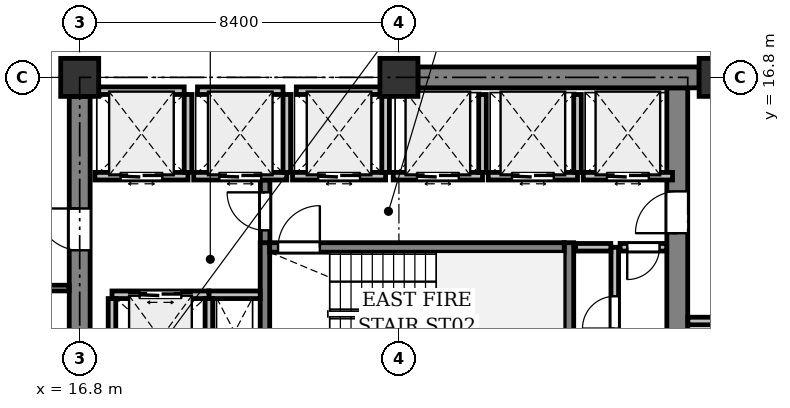
"""IFC4 building model, lengths in metres.
Left out: names, types, materials, properties, quantities, classifications, styles, units other than length and angle.
Written with IfcOpenShell. Run it as: python <this file> out.ifc"""

import sys

from ifc_helpers import new_model, si_unit, direction, frame, frame_2d, origin, origin_2d, place, context, subcontext, project, spatial, rectangle, extrude, element, fill, save


model = new_model("IFC4")
c1 = context("Model", 3, precision=1e-05, world=origin(), true_north=direction((0.0, 1.0)))
c2 = subcontext(c1, "Body", "Model", "MODEL_VIEW")
j1 = project(units=[si_unit("LENGTHUNIT", "METRE"), si_unit("PLANEANGLEUNIT", "RADIAN")], contexts=[c1])
p1 = place(None, origin())
s1 = spatial("IfcSite", under=j1, at=p1, CompositionType="ELEMENT")
p2 = place(p1, origin())
s2 = spatial("IfcBuilding", under=s1, at=p2, CompositionType="ELEMENT")
p3 = place(p2, frame((0.0, 0.0, 220.6)))
s3 = spatial("IfcBuildingStorey", under=s2, at=p3, CompositionType="ELEMENT", Elevation=220.6)
for number, where, z_axis, x_axis in (
    (1, (16.8, 16.8, 0.0), (0.0, 0.0, 1.0), (1.0, 0.0, 0.0)),
    (2, (25.2, 16.8, 0.0), (0.0, 0.0, 1.0), (1.0, 0.0, 0.0)),
    (3, (33.6, 16.8, 0.0), (0.0, 0.0, 1.0), (1.0, 0.0, 0.0)),
):
    element("IfcColumn", number, at=place(p3, frame(where, z_axis=z_axis, x_axis=x_axis)), inside=s3, PredefinedType="COLUMN", context=c2, shape_type="SweptSolid", body=[
        extrude(rectangle(XDim=1.0, YDim=1.0, at=origin_2d()), origin(), (0.0, 0.0, 1.0), 4.1),
    ])
p4 = place(p3, frame((32.525, 8.675, 0.0), z_axis=(0.0, 0.0, 1.0), x_axis=(0.0, 1.0, 0.0)))
e4 = element("IfcWall", 4, at=p4, inside=s3, PredefinedType="SHEAR", context=c2, shape_type="SweptSolid", body=[
    extrude(rectangle(XDim=7.85, YDim=0.55, at=frame_2d((3.925, 0.0))), origin(), (0.0, 0.0, 1.0), 3.825),
])
p5 = place(p4, frame((4.025, 0.0, 0.0)))
e5 = element("IfcOpeningElement", 5, at=p5, cuts=e4, PredefinedType="OPENING", context=c2, shape_type="SweptSolid", body=[
    extrude(rectangle(XDim=1.1, YDim=2.15, at=frame_2d((0.55, 1.075))), frame((0.0, 0.285, 0.0), z_axis=(0.0, -1.0, 0.0), x_axis=(1.0, 0.0, 0.0)), (0.0, 0.0, 1.0), 0.57),
])
p6 = place(p3, frame((16.8, 8.9, 0.0), z_axis=(0.0, 0.0, 1.0), x_axis=(0.0, 1.0, 0.0)))
e6 = element("IfcWall", 6, at=p6, inside=s3, PredefinedType="SHEAR", context=c2, shape_type="SweptSolid", body=[
    extrude(rectangle(XDim=7.4, YDim=0.55, at=frame_2d((3.7, 0.0))), origin(), (0.0, 0.0, 1.0), 3.825),
])
p7 = place(p6, frame((3.35, 0.0, 0.0)))
e7 = element("IfcOpeningElement", 7, at=p7, cuts=e6, PredefinedType="OPENING", context=c2, shape_type="SweptSolid", body=[
    extrude(rectangle(XDim=1.1, YDim=2.15, at=frame_2d((0.55, 1.075))), frame((0.0, 0.285, 0.0), z_axis=(0.0, -1.0, 0.0), x_axis=(1.0, 0.0, 0.0)), (0.0, 0.0, 1.0), 0.57),
])
p8 = place(p3, frame((25.7, 16.8, 0.0), z_axis=(0.0, 0.0, 1.0), x_axis=(1.0, 0.0, 0.0)))
e8 = element("IfcWall", 8, at=p8, inside=s3, PredefinedType="SHEAR", context=c2, shape_type="SweptSolid", body=[
    extrude(rectangle(XDim=7.4, YDim=0.55, at=frame_2d((3.7, 0.0))), origin(), (0.0, 0.0, 1.0), 3.825),
])
for number, where, z_axis, x_axis in (
    (9, (21.675, 8.7, 0.0), (0.0, 0.0, 1.0), (0.0, 1.0, 0.0)),
    (10, (29.675, 8.7, 0.0), (0.0, 0.0, 1.0), (0.0, 1.0, 0.0)),
):
    element("IfcWall", number, at=place(p3, frame(where, z_axis=z_axis, x_axis=x_axis)), inside=s3, PredefinedType="SHEAR", context=c2, shape_type="SweptSolid", body=[
        extrude(rectangle(XDim=3.75, YDim=0.25, at=frame_2d((1.875, 0.0))), origin(), (0.0, 0.0, 1.0), 3.825),
    ])
p9 = place(p3, frame((21.8, 12.325, 0.0), z_axis=(0.0, 0.0, 1.0), x_axis=(1.0, 0.0, 0.0)))
e11 = element("IfcWall", 11, at=p9, inside=s3, PredefinedType="SHEAR", context=c2, shape_type="SweptSolid", body=[
    extrude(rectangle(XDim=7.75, YDim=0.25, at=frame_2d((3.875, 0.0))), origin(), (0.0, 0.0, 1.0), 3.825),
])
p10 = place(p9, frame((0.22, 0.0, 0.0)))
e12 = element("IfcOpeningElement", 12, at=p10, cuts=e11, PredefinedType="OPENING", context=c2, shape_type="SweptSolid", body=[
    extrude(rectangle(XDim=1.1, YDim=2.15, at=frame_2d((0.55, 1.075))), frame((0.0, 0.135, 0.0), z_axis=(0.0, -1.0, 0.0), x_axis=(1.0, 0.0, 0.0)), (0.0, 0.0, 1.0), 0.27),
])
p11 = place(p3, frame((20.2, 11.08, 0.0), z_axis=(0.0, 0.0, 1.0), x_axis=(1.0, 0.0, 0.0)))
e13 = element("IfcWall", 13, at=p11, inside=s3, PredefinedType="PARTITIONING", context=c2, shape_type="SweptSolid", body=[
    extrude(rectangle(XDim=1.35, YDim=0.2, at=frame_2d((0.675, 0.0))), origin(), (0.0, 0.0, 1.0), 3.825),
])
p12 = place(p3, frame((21.68, 12.45, 0.0), z_axis=(0.0, 0.0, 1.0), x_axis=(0.0, 1.0, 0.0)))
e14 = element("IfcWall", 14, at=p12, inside=s3, PredefinedType="SHEAR", context=c2, shape_type="SweptSolid", body=[
    extrude(rectangle(XDim=1.65, YDim=0.25, at=frame_2d((0.825, 0.0))), origin(), (0.0, 0.0, 1.0), 3.825),
])
p13 = place(p12, frame((0.325, 0.0, 0.0)))
e15 = element("IfcOpeningElement", 15, at=p13, cuts=e14, PredefinedType="OPENING", context=c2, shape_type="SweptSolid", body=[
    extrude(rectangle(XDim=1.0, YDim=2.15, at=frame_2d((0.5, 1.075))), frame((0.0, 0.135, 0.0), z_axis=(0.0, -1.0, 0.0), x_axis=(1.0, 0.0, 0.0)), (0.0, 0.0, 1.0), 0.27),
])
p14 = place(p3, frame((17.65, 11.08, 0.0), z_axis=(0.0, 0.0, 1.0), x_axis=(1.0, 0.0, 0.0)))
e16 = element("IfcWall", 16, at=p14, inside=s3, PredefinedType="PARTITIONING", context=c2, shape_type="SweptSolid", body=[
    extrude(rectangle(XDim=2.55, YDim=0.2, at=frame_2d((1.275, 0.0))), origin(), (0.0, 0.0, 1.0), 3.825),
])
p15 = place(p14, frame((0.725, 0.0, 0.0)))
e17 = element("IfcOpeningElement", 17, at=p15, cuts=e16, PredefinedType="OPENING", context=c2, shape_type="SweptSolid", body=[
    extrude(rectangle(XDim=1.1, YDim=2.2, at=frame_2d((0.55, 1.1))), frame((0.0, 0.11, 0.0), z_axis=(0.0, -1.0, 0.0), x_axis=(1.0, 0.0, 0.0)), (0.0, 0.0, 1.0), 0.22),
])
for number, where, z_axis, x_axis in (
    (18, (20.2, 8.88, 0.0), (0.0, 0.0, 1.0), (0.0, 1.0, 0.0)),
    (19, (17.65, 8.88, 0.0), (0.0, 0.0, 1.0), (0.0, 1.0, 0.0)),
):
    element("IfcWall", number, at=place(p3, frame(where, z_axis=z_axis, x_axis=x_axis)), inside=s3, PredefinedType="PARTITIONING", context=c2, shape_type="SweptSolid", body=[
        extrude(rectangle(XDim=2.1, YDim=0.2, at=frame_2d((1.05, 0.0))), origin(), (0.0, 0.0, 1.0), 3.825),
    ])
p16 = place(p3, frame((17.2, 14.2, 0.0), z_axis=(0.0, 0.0, 1.0), x_axis=(1.0, 0.0, 0.0)))
e20 = element("IfcWall", 20, at=p16, inside=s3, PredefinedType="PARTITIONING", context=c2, shape_type="SweptSolid", body=[
    extrude(rectangle(XDim=2.45, YDim=0.2, at=frame_2d((1.225, 0.0))), origin(), (0.0, 0.0, 1.0), 3.825),
])
p17 = place(p16, frame((0.675, 0.0, 0.0)))
e21 = element("IfcOpeningElement", 21, at=p17, cuts=e20, PredefinedType="OPENING", context=c2, shape_type="SweptSolid", body=[
    extrude(rectangle(XDim=1.1, YDim=2.2, at=frame_2d((0.55, 1.1))), frame((0.0, 0.11, 0.0), z_axis=(0.0, -1.0, 0.0), x_axis=(1.0, 0.0, 0.0)), (0.0, 0.0, 1.0), 0.22),
])
p18 = place(p3, frame((19.65, 14.3, 0.0), z_axis=(0.0, 0.0, 1.0), x_axis=(0.0, 1.0, 0.0)))
e22 = element("IfcWall", 22, at=p18, inside=s3, PredefinedType="PARTITIONING", context=c2, shape_type="SweptSolid", body=[
    extrude(rectangle(XDim=2.05, YDim=0.2, at=frame_2d((1.025, 0.0))), origin(), (0.0, 0.0, 1.0), 3.825),
])
p19 = place(p3, frame((17.3, 16.45, 0.0), z_axis=(0.0, 0.0, 1.0), x_axis=(1.0, 0.0, 0.0)))
e23 = element("IfcWall", 23, at=p19, inside=s3, PredefinedType="PARTITIONING", context=c2, shape_type="SweptSolid", body=[
    extrude(rectangle(XDim=2.25, YDim=0.2, at=frame_2d((1.125, 0.0))), origin(), (0.0, 0.0, 1.0), 3.825),
])
p20 = place(p3, frame((19.8, 14.2, 0.0), z_axis=(0.0, 0.0, 1.0), x_axis=(1.0, 0.0, 0.0)))
e24 = element("IfcWall", 24, at=p20, inside=s3, PredefinedType="PARTITIONING", context=c2, shape_type="SweptSolid", body=[
    extrude(rectangle(XDim=2.45, YDim=0.2, at=frame_2d((1.225, 0.0))), origin(), (0.0, 0.0, 1.0), 3.825),
])
p21 = place(p20, frame((0.675, 0.0, 0.0)))
e25 = element("IfcOpeningElement", 25, at=p21, cuts=e24, PredefinedType="OPENING", context=c2, shape_type="SweptSolid", body=[
    extrude(rectangle(XDim=1.1, YDim=2.2, at=frame_2d((0.55, 1.1))), frame((0.0, 0.11, 0.0), z_axis=(0.0, -1.0, 0.0), x_axis=(1.0, 0.0, 0.0)), (0.0, 0.0, 1.0), 0.22),
])
p22 = place(p3, frame((22.25, 14.3, 0.0), z_axis=(0.0, 0.0, 1.0), x_axis=(0.0, 1.0, 0.0)))
e26 = element("IfcWall", 26, at=p22, inside=s3, PredefinedType="PARTITIONING", context=c2, shape_type="SweptSolid", body=[
    extrude(rectangle(XDim=2.05, YDim=0.2, at=frame_2d((1.025, 0.0))), origin(), (0.0, 0.0, 1.0), 3.825),
])
p23 = place(p3, frame((19.9, 16.45, 0.0), z_axis=(0.0, 0.0, 1.0), x_axis=(1.0, 0.0, 0.0)))
e27 = element("IfcWall", 27, at=p23, inside=s3, PredefinedType="PARTITIONING", context=c2, shape_type="SweptSolid", body=[
    extrude(rectangle(XDim=2.25, YDim=0.2, at=frame_2d((1.125, 0.0))), origin(), (0.0, 0.0, 1.0), 3.825),
])
p24 = place(p3, frame((22.4, 14.2, 0.0), z_axis=(0.0, 0.0, 1.0), x_axis=(1.0, 0.0, 0.0)))
e28 = element("IfcWall", 28, at=p24, inside=s3, PredefinedType="PARTITIONING", context=c2, shape_type="SweptSolid", body=[
    extrude(rectangle(XDim=2.45, YDim=0.2, at=frame_2d((1.225, 0.0))), origin(), (0.0, 0.0, 1.0), 3.825),
])
p25 = place(p24, frame((0.675, 0.0, 0.0)))
e29 = element("IfcOpeningElement", 29, at=p25, cuts=e28, PredefinedType="OPENING", context=c2, shape_type="SweptSolid", body=[
    extrude(rectangle(XDim=1.1, YDim=2.2, at=frame_2d((0.55, 1.1))), frame((0.0, 0.11, 0.0), z_axis=(0.0, -1.0, 0.0), x_axis=(1.0, 0.0, 0.0)), (0.0, 0.0, 1.0), 0.22),
])
p26 = place(p3, frame((24.85, 14.3, 0.0), z_axis=(0.0, 0.0, 1.0), x_axis=(0.0, 1.0, 0.0)))
e30 = element("IfcWall", 30, at=p26, inside=s3, PredefinedType="PARTITIONING", context=c2, shape_type="SweptSolid", body=[
    extrude(rectangle(XDim=2.05, YDim=0.2, at=frame_2d((1.025, 0.0))), origin(), (0.0, 0.0, 1.0), 3.825),
])
p27 = place(p3, frame((22.5, 16.45, 0.0), z_axis=(0.0, 0.0, 1.0), x_axis=(1.0, 0.0, 0.0)))
e31 = element("IfcWall", 31, at=p27, inside=s3, PredefinedType="PARTITIONING", context=c2, shape_type="SweptSolid", body=[
    extrude(rectangle(XDim=2.25, YDim=0.2, at=frame_2d((1.125, 0.0))), origin(), (0.0, 0.0, 1.0), 3.825),
])
p28 = place(p3, frame((25.05, 14.2, 0.0), z_axis=(0.0, 0.0, 1.0), x_axis=(1.0, 0.0, 0.0)))
e32 = element("IfcWall", 32, at=p28, inside=s3, PredefinedType="PARTITIONING", context=c2, shape_type="SweptSolid", body=[
    extrude(rectangle(XDim=2.35, YDim=0.2, at=frame_2d((1.175, 0.0))), origin(), (0.0, 0.0, 1.0), 3.825),
])
p29 = place(p28, frame((0.625, 0.0, 0.0)))
e33 = element("IfcOpeningElement", 33, at=p29, cuts=e32, PredefinedType="OPENING", context=c2, shape_type="SweptSolid", body=[
    extrude(rectangle(XDim=1.1, YDim=2.2, at=frame_2d((0.55, 1.1))), frame((0.0, 0.11, 0.0), z_axis=(0.0, -1.0, 0.0), x_axis=(1.0, 0.0, 0.0)), (0.0, 0.0, 1.0), 0.22),
])
p30 = place(p3, frame((27.4, 14.3, 0.0), z_axis=(0.0, 0.0, 1.0), x_axis=(0.0, 1.0, 0.0)))
e34 = element("IfcWall", 34, at=p30, inside=s3, PredefinedType="PARTITIONING", context=c2, shape_type="SweptSolid", body=[
    extrude(rectangle(XDim=2.05, YDim=0.2, at=frame_2d((1.025, 0.0))), origin(), (0.0, 0.0, 1.0), 3.825),
])
p31 = place(p3, frame((27.55, 14.2, 0.0), z_axis=(0.0, 0.0, 1.0), x_axis=(1.0, 0.0, 0.0)))
e35 = element("IfcWall", 35, at=p31, inside=s3, PredefinedType="PARTITIONING", context=c2, shape_type="SweptSolid", body=[
    extrude(rectangle(XDim=2.35, YDim=0.2, at=frame_2d((1.175, 0.0))), origin(), (0.0, 0.0, 1.0), 3.825),
])
p32 = place(p31, frame((0.625, 0.0, 0.0)))
e36 = element("IfcOpeningElement", 36, at=p32, cuts=e35, PredefinedType="OPENING", context=c2, shape_type="SweptSolid", body=[
    extrude(rectangle(XDim=1.1, YDim=2.2, at=frame_2d((0.55, 1.1))), frame((0.0, 0.11, 0.0), z_axis=(0.0, -1.0, 0.0), x_axis=(1.0, 0.0, 0.0)), (0.0, 0.0, 1.0), 0.22),
])
p33 = place(p3, frame((29.9, 14.3, 0.0), z_axis=(0.0, 0.0, 1.0), x_axis=(0.0, 1.0, 0.0)))
e37 = element("IfcWall", 37, at=p33, inside=s3, PredefinedType="PARTITIONING", context=c2, shape_type="SweptSolid", body=[
    extrude(rectangle(XDim=2.05, YDim=0.2, at=frame_2d((1.025, 0.0))), origin(), (0.0, 0.0, 1.0), 3.825),
])
p34 = place(p3, frame((30.05, 14.2, 0.0), z_axis=(0.0, 0.0, 1.0), x_axis=(1.0, 0.0, 0.0)))
e38 = element("IfcWall", 38, at=p34, inside=s3, PredefinedType="PARTITIONING", context=c2, shape_type="SweptSolid", body=[
    extrude(rectangle(XDim=2.35, YDim=0.2, at=frame_2d((1.175, 0.0))), origin(), (0.0, 0.0, 1.0), 3.825),
])
p35 = place(p34, frame((0.625, 0.0, 0.0)))
e39 = element("IfcOpeningElement", 39, at=p35, cuts=e38, PredefinedType="OPENING", context=c2, shape_type="SweptSolid", body=[
    extrude(rectangle(XDim=1.1, YDim=2.2, at=frame_2d((0.55, 1.1))), frame((0.0, 0.11, 0.0), z_axis=(0.0, -1.0, 0.0), x_axis=(1.0, 0.0, 0.0)), (0.0, 0.0, 1.0), 0.22),
])
p36 = place(p3, frame((30.88, 8.9, 0.0), z_axis=(0.0, 0.0, 1.0), x_axis=(0.0, 1.0, 0.0)))
e40 = element("IfcWall", 40, at=p36, inside=s3, PredefinedType="PARTITIONING", context=c2, shape_type="SweptSolid", body=[
    extrude(rectangle(XDim=3.43, YDim=0.2, at=frame_2d((1.715, 0.0))), origin(), (0.0, 0.0, 1.0), 3.825),
])
p37 = place(p36, frame((1.29, 0.0, 0.0)))
e41 = element("IfcOpeningElement", 41, at=p37, cuts=e40, PredefinedType="OPENING", context=c2, shape_type="SweptSolid", body=[
    extrude(rectangle(XDim=0.85, YDim=2.15, at=frame_2d((0.425, 1.075))), frame((0.0, 0.11, 0.0), z_axis=(0.0, -1.0, 0.0), x_axis=(1.0, 0.0, 0.0)), (0.0, 0.0, 1.0), 0.22),
])
p38 = place(p3, frame((30.776, 12.33, 0.0), z_axis=(0.0, 0.0, 1.0), x_axis=(-1.0, 0.0, 0.0)))
e42 = element("IfcWall", 42, at=p38, inside=s3, PredefinedType="PARTITIONING", context=c2, shape_type="SweptSolid", body=[
    extrude(rectangle(XDim=0.926, YDim=0.2, at=frame_2d((0.463, 0.0))), origin(), (0.0, 0.0, 1.0), 3.825),
])
p39 = place(p3, frame((32.246, 12.33, 0.0), z_axis=(0.0, 0.0, 1.0), x_axis=(-1.0, 0.0, 0.0)))
e43 = element("IfcWall", 43, at=p39, inside=s3, PredefinedType="PARTITIONING", context=c2, shape_type="SweptSolid", body=[
    extrude(rectangle(XDim=1.226, YDim=0.2, at=frame_2d((0.613, 0.0))), origin(), (0.0, 0.0, 1.0), 3.825),
])
p40 = place(p39, frame((0.188, 0.0, 0.0)))
e44 = element("IfcOpeningElement", 44, at=p40, cuts=e43, PredefinedType="OPENING", context=c2, shape_type="SweptSolid", body=[
    extrude(rectangle(XDim=0.85, YDim=2.15, at=frame_2d((0.425, 1.075))), frame((0.0, 0.11, 0.0), z_axis=(0.0, -1.0, 0.0), x_axis=(1.0, 0.0, 0.0)), (0.0, 0.0, 1.0), 0.22),
])
p41 = place(p3, frame((7.789, 11.256, 0.0), z_axis=(0.0, 0.0, 1.0), x_axis=(1.0, 0.0, 0.0)))
e45 = element("IfcWall", 45, at=p41, inside=s3, PredefinedType="PARTITIONING", context=c2, shape_type="SweptSolid", body=[
    extrude(rectangle(XDim=8.732, YDim=0.15, at=frame_2d((4.366, 0.0))), origin(), (0.0, 0.0, 1.0), 3.371),
])
p42 = place(p41, frame((6.66, 0.0, 0.0)))
e46 = element("IfcOpeningElement", 46, at=p42, cuts=e45, PredefinedType="OPENING", context=c2, shape_type="SweptSolid", body=[
    extrude(rectangle(XDim=1.0, YDim=2.15, at=frame_2d((0.5, 1.075))), frame((0.0, 0.085, 0.0), z_axis=(0.0, -1.0, 0.0), x_axis=(1.0, 0.0, 0.0)), (0.0, 0.0, 1.0), 0.17),
])
p43 = place(p3, frame((34.34, 10.389, 0.0), z_axis=(0.0, 0.0, 1.0), x_axis=(-1.0, 0.0, 0.0)))
e47 = element("IfcWall", 47, at=p43, inside=s3, PredefinedType="PARTITIONING", context=c2, shape_type="SweptSolid", body=[
    extrude(rectangle(XDim=1.536, YDim=0.2, at=frame_2d((0.768, 0.0))), origin(), (0.0, 0.0, 1.0), 3.371),
])
p44 = place(p5, origin())
e48 = element("IfcDoor", 48, at=p44, inside=s3, OperationType="SINGLE_SWING_LEFT", PredefinedType="DOOR", context=c2, shape_type="SweptSolid", body=[
    extrude(rectangle(XDim=1.1, YDim=2.15, at=frame_2d((0.55, 1.075))), frame((0.0, 0.025, 0.0), z_axis=(0.0, -1.0, 0.0), x_axis=(1.0, 0.0, 0.0)), (0.0, 0.0, 1.0), 0.05),
])
fill(e5, e48)
p45 = place(p7, origin())
e49 = element("IfcDoor", 49, at=p45, inside=s3, OperationType="SINGLE_SWING_RIGHT", PredefinedType="DOOR", context=c2, shape_type="SweptSolid", body=[
    extrude(rectangle(XDim=1.1, YDim=2.15, at=frame_2d((0.55, 1.075))), frame((0.0, 0.025, 0.0), z_axis=(0.0, -1.0, 0.0), x_axis=(1.0, 0.0, 0.0)), (0.0, 0.0, 1.0), 0.05),
])
fill(e7, e49)
p46 = place(p10, origin())
e50 = element("IfcDoor", 50, at=p46, inside=s3, OperationType="SINGLE_SWING_RIGHT", PredefinedType="DOOR", context=c2, shape_type="SweptSolid", body=[
    extrude(rectangle(XDim=1.1, YDim=2.15, at=frame_2d((0.55, 1.075))), frame((0.0, 0.025, 0.0), z_axis=(0.0, -1.0, 0.0), x_axis=(1.0, 0.0, 0.0)), (0.0, 0.0, 1.0), 0.05),
])
fill(e12, e50)
p47 = place(p13, origin())
e51 = element("IfcDoor", 51, at=p47, inside=s3, OperationType="SINGLE_SWING_RIGHT", PredefinedType="DOOR", context=c2, shape_type="SweptSolid", body=[
    extrude(rectangle(XDim=1.0, YDim=2.15, at=frame_2d((0.5, 1.075))), frame((0.0, 0.025, 0.0), z_axis=(0.0, -1.0, 0.0), x_axis=(1.0, 0.0, 0.0)), (0.0, 0.0, 1.0), 0.05),
])
fill(e15, e51)
p48 = place(p15, origin())
e52 = element("IfcDoor", 52, at=p48, inside=s3, OperationType="DOUBLE_DOOR_SLIDING", PredefinedType="DOOR", context=c2, shape_type="SweptSolid", body=[
    extrude(rectangle(XDim=1.1, YDim=2.2, at=frame_2d((0.55, 1.1))), frame((0.0, 0.025, 0.0), z_axis=(0.0, -1.0, 0.0), x_axis=(1.0, 0.0, 0.0)), (0.0, 0.0, 1.0), 0.05),
])
fill(e17, e52)
p49 = place(p17, origin())
e53 = element("IfcDoor", 53, at=p49, inside=s3, OperationType="DOUBLE_DOOR_SLIDING", PredefinedType="DOOR", context=c2, shape_type="SweptSolid", body=[
    extrude(rectangle(XDim=1.1, YDim=2.2, at=frame_2d((0.55, 1.1))), frame((0.0, 0.025, 0.0), z_axis=(0.0, -1.0, 0.0), x_axis=(1.0, 0.0, 0.0)), (0.0, 0.0, 1.0), 0.05),
])
fill(e21, e53)
p50 = place(p21, origin())
e54 = element("IfcDoor", 54, at=p50, inside=s3, OperationType="DOUBLE_DOOR_SLIDING", PredefinedType="DOOR", context=c2, shape_type="SweptSolid", body=[
    extrude(rectangle(XDim=1.1, YDim=2.2, at=frame_2d((0.55, 1.1))), frame((0.0, 0.025, 0.0), z_axis=(0.0, -1.0, 0.0), x_axis=(1.0, 0.0, 0.0)), (0.0, 0.0, 1.0), 0.05),
])
fill(e25, e54)
p51 = place(p25, origin())
e55 = element("IfcDoor", 55, at=p51, inside=s3, OperationType="DOUBLE_DOOR_SLIDING", PredefinedType="DOOR", context=c2, shape_type="SweptSolid", body=[
    extrude(rectangle(XDim=1.1, YDim=2.2, at=frame_2d((0.55, 1.1))), frame((0.0, 0.025, 0.0), z_axis=(0.0, -1.0, 0.0), x_axis=(1.0, 0.0, 0.0)), (0.0, 0.0, 1.0), 0.05),
])
fill(e29, e55)
p52 = place(p29, origin())
e56 = element("IfcDoor", 56, at=p52, inside=s3, OperationType="DOUBLE_DOOR_SLIDING", PredefinedType="DOOR", context=c2, shape_type="SweptSolid", body=[
    extrude(rectangle(XDim=1.1, YDim=2.2, at=frame_2d((0.55, 1.1))), frame((0.0, 0.025, 0.0), z_axis=(0.0, -1.0, 0.0), x_axis=(1.0, 0.0, 0.0)), (0.0, 0.0, 1.0), 0.05),
])
fill(e33, e56)
p53 = place(p32, origin())
e57 = element("IfcDoor", 57, at=p53, inside=s3, OperationType="DOUBLE_DOOR_SLIDING", PredefinedType="DOOR", context=c2, shape_type="SweptSolid", body=[
    extrude(rectangle(XDim=1.1, YDim=2.2, at=frame_2d((0.55, 1.1))), frame((0.0, 0.025, 0.0), z_axis=(0.0, -1.0, 0.0), x_axis=(1.0, 0.0, 0.0)), (0.0, 0.0, 1.0), 0.05),
])
fill(e36, e57)
p54 = place(p35, origin())
e58 = element("IfcDoor", 58, at=p54, inside=s3, OperationType="DOUBLE_DOOR_SLIDING", PredefinedType="DOOR", context=c2, shape_type="SweptSolid", body=[
    extrude(rectangle(XDim=1.1, YDim=2.2, at=frame_2d((0.55, 1.1))), frame((0.0, 0.025, 0.0), z_axis=(0.0, -1.0, 0.0), x_axis=(1.0, 0.0, 0.0)), (0.0, 0.0, 1.0), 0.05),
])
fill(e39, e58)
p55 = place(p37, origin())
e59 = element("IfcDoor", 59, at=p55, inside=s3, OperationType="SINGLE_SWING_LEFT", PredefinedType="DOOR", context=c2, shape_type="SweptSolid", body=[
    extrude(rectangle(XDim=0.85, YDim=2.15, at=frame_2d((0.425, 1.075))), frame((0.0, 0.025, 0.0), z_axis=(0.0, -1.0, 0.0), x_axis=(1.0, 0.0, 0.0)), (0.0, 0.0, 1.0), 0.05),
])
fill(e41, e59)
p56 = place(p40, origin())
e60 = element("IfcDoor", 60, at=p56, inside=s3, OperationType="SINGLE_SWING_RIGHT", PredefinedType="DOOR", context=c2, shape_type="SweptSolid", body=[
    extrude(rectangle(XDim=0.85, YDim=2.15, at=frame_2d((0.425, 1.075))), frame((0.0, 0.025, 0.0), z_axis=(0.0, -1.0, 0.0), x_axis=(1.0, 0.0, 0.0)), (0.0, 0.0, 1.0), 0.05),
])
fill(e44, e60)
save(model, sys.argv[1])
